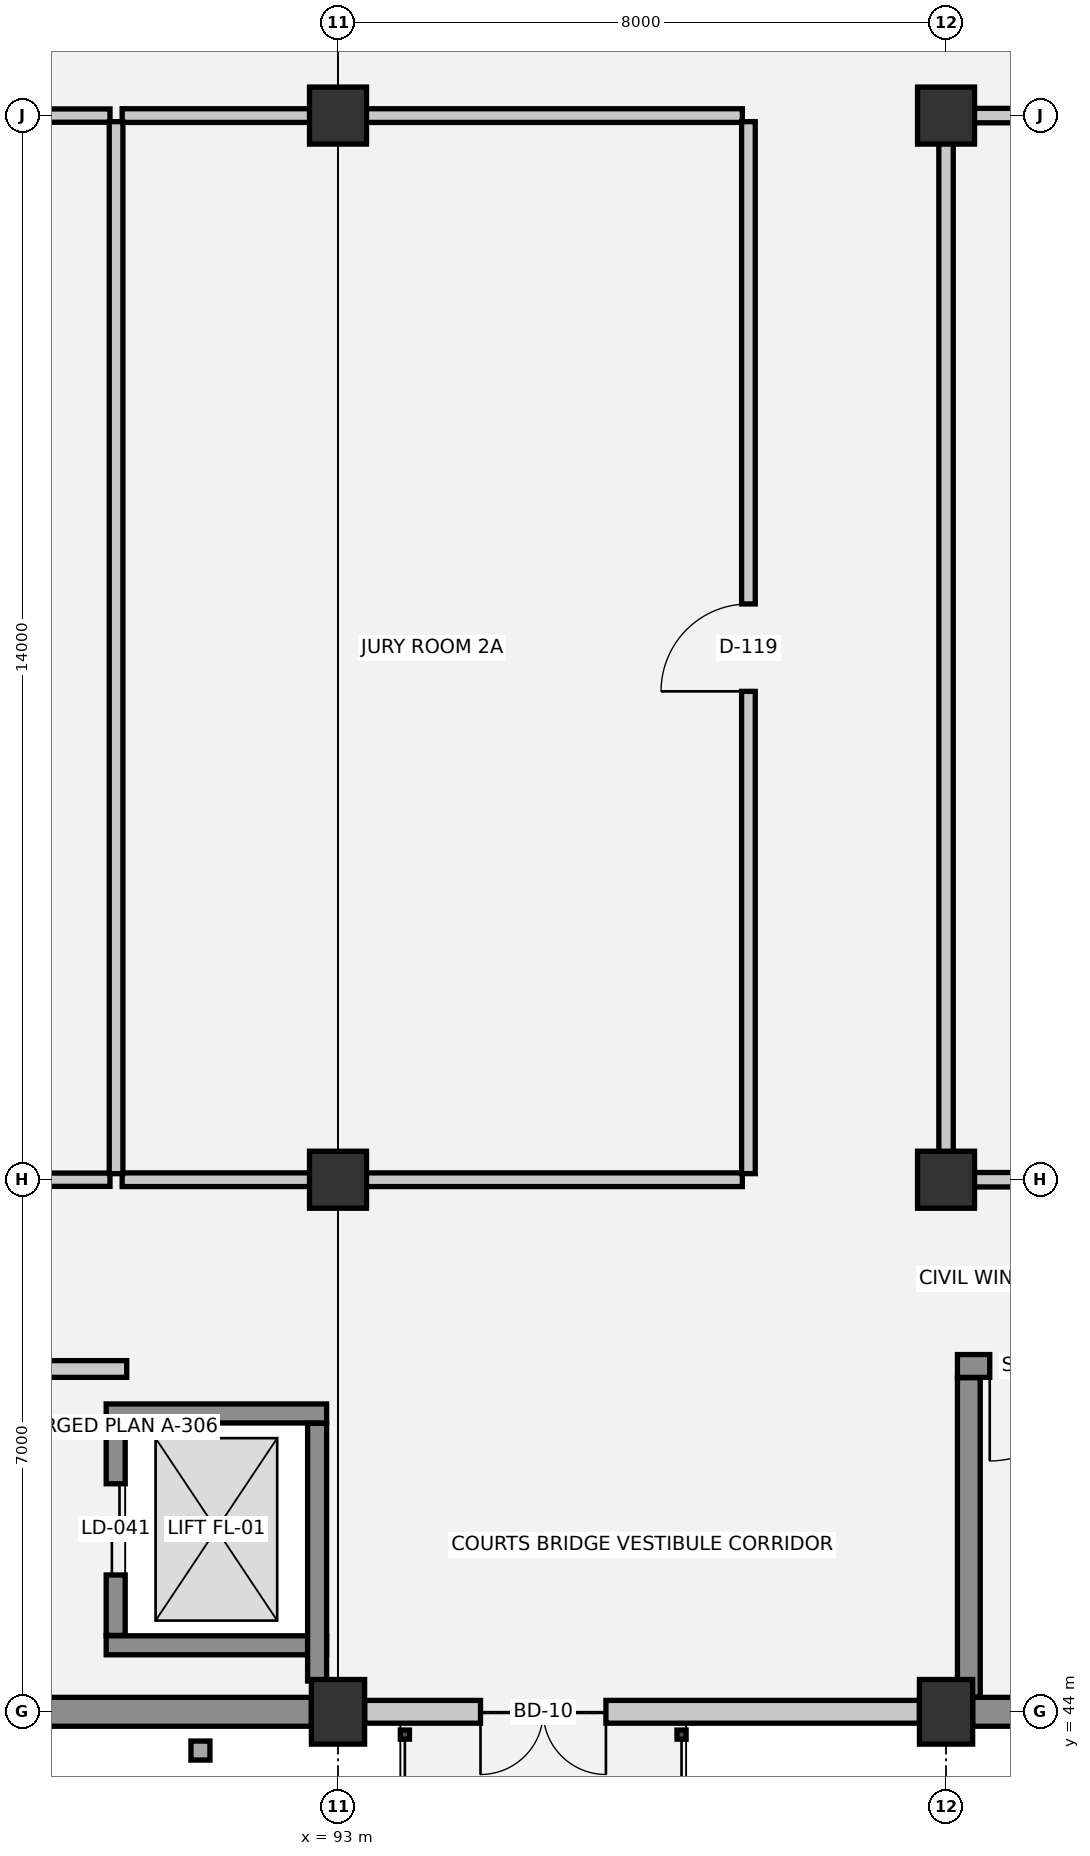
"""IFC4 building model, lengths in metres.
Left out: names, types, materials, properties, quantities, classifications, styles, units other than length and angle.
Written with IfcOpenShell. Run it as: python <this file> out.ifc"""

import sys

from ifc_helpers import new_model, si_unit, direction, frame, frame_2d, origin, origin_2d, place, context, subcontext, project, spatial, rectangle, extrude, element, fill, save


model = new_model("IFC4")
c1 = context("Model", 3, precision=1e-05, world=origin(), true_north=direction((0.0, 1.0)))
c2 = subcontext(c1, "Body", "Model", "MODEL_VIEW")
j1 = project(units=[si_unit("LENGTHUNIT", "METRE"), si_unit("PLANEANGLEUNIT", "RADIAN")], contexts=[c1])
p1 = place(None, origin())
s1 = spatial("IfcSite", under=j1, at=p1, CompositionType="ELEMENT")
p2 = place(p1, origin())
s2 = spatial("IfcBuilding", under=s1, at=p2, CompositionType="ELEMENT")
p3 = place(p2, frame((0.0, 0.0, 5.4)))
s3 = spatial("IfcBuildingStorey", under=s2, at=p3, CompositionType="ELEMENT", Elevation=5.4)
p4 = place(p3, frame((93.0, 44.0, 0.0), z_axis=(0.0, 0.0, 1.0), x_axis=(1.0, 0.0, 0.0)))
e1 = element("IfcColumn", 1, at=p4, inside=s3, PredefinedType="COLUMN", context=c2, shape_type="SweptSolid", body=[
    extrude(rectangle(XDim=0.7, YDim=0.85, at=origin_2d()), origin(), (0.0, 0.0, 1.0), 4.5),
])
for number, where, z_axis, x_axis in (
    (2, (93.0, 51.0, 0.0), (0.0, 0.0, 1.0), (1.0, 0.0, 0.0)),
    (3, (93.0, 65.0, 0.0), (0.0, 0.0, 1.0), (1.0, 0.0, 0.0)),
):
    element("IfcColumn", number, at=place(p3, frame(where, z_axis=z_axis, x_axis=x_axis)), inside=s3, PredefinedType="COLUMN", context=c2, shape_type="SweptSolid", body=[
        extrude(rectangle(XDim=0.75, YDim=0.75, at=origin_2d()), origin(), (0.0, 0.0, 1.0), 4.5),
    ])
p5 = place(p3, frame((101.0, 44.0, 0.0), z_axis=(0.0, 0.0, 1.0), x_axis=(1.0, 0.0, 0.0)))
e4 = element("IfcColumn", 4, at=p5, inside=s3, PredefinedType="COLUMN", context=c2, shape_type="SweptSolid", body=[
    extrude(rectangle(XDim=0.7, YDim=0.85, at=origin_2d()), origin(), (0.0, 0.0, 1.0), 4.5),
])
for number, where, z_axis, x_axis in (
    (5, (101.0, 51.0, 0.0), (0.0, 0.0, 1.0), (1.0, 0.0, 0.0)),
    (6, (101.0, 65.0, 0.0), (0.0, 0.0, 1.0), (1.0, 0.0, 0.0)),
):
    element("IfcColumn", number, at=place(p3, frame(where, z_axis=z_axis, x_axis=x_axis)), inside=s3, PredefinedType="COLUMN", context=c2, shape_type="SweptSolid", body=[
        extrude(rectangle(XDim=0.75, YDim=0.75, at=origin_2d()), origin(), (0.0, 0.0, 1.0), 4.5),
    ])
p6 = place(p3, frame((108.65, 44.0, 0.0), z_axis=(0.0, 0.0, 1.0), x_axis=(-1.0, 0.0, 0.0)))
e7 = element("IfcWall", 7, at=p6, inside=s3, PredefinedType="STANDARD", context=c2, shape_type="SweptSolid", body=[
    extrude(rectangle(XDim=7.3, YDim=0.38, at=frame_2d((3.65, 0.0))), origin(), (0.0, 0.0, 1.0), 3.23),
])
p7 = place(p6, frame((3.075, 0.0, 0.95)))
e8 = element("IfcOpeningElement", 8, at=p7, cuts=e7, PredefinedType="OPENING", context=c2, shape_type="SweptSolid", body=[
    extrude(rectangle(XDim=1.15, YDim=1.65, at=frame_2d((0.575, 0.825))), frame((0.0, 0.2, 0.0), z_axis=(0.0, -1.0, 0.0), x_axis=(1.0, 0.0, 0.0)), (0.0, 0.0, 1.0), 0.4),
])
p8 = place(p3, frame((100.65, 44.0, 0.0), z_axis=(0.0, 0.0, 1.0), x_axis=(-1.0, 0.0, 0.0)))
e9 = element("IfcWall", 9, at=p8, inside=s3, PredefinedType="SOLIDWALL", context=c2, shape_type="SweptSolid", body=[
    extrude(rectangle(XDim=7.3, YDim=0.3, at=frame_2d((3.65, 0.0))), origin(), (0.0, 0.0, 1.0), 3.23),
])
p9 = place(p8, frame((4.125, 0.0, 0.0)))
e10 = element("IfcOpeningElement", 10, at=p9, cuts=e9, PredefinedType="OPENING", context=c2, shape_type="SweptSolid", body=[
    extrude(rectangle(XDim=1.65, YDim=2.2, at=frame_2d((0.825, 1.1))), frame((0.0, 0.16, 0.0), z_axis=(0.0, -1.0, 0.0), x_axis=(1.0, 0.0, 0.0)), (0.0, 0.0, 1.0), 0.32),
])
p10 = place(p3, frame((92.65, 44.0, 0.0), z_axis=(0.0, 0.0, 1.0), x_axis=(-1.0, 0.0, 0.0)))
e11 = element("IfcWall", 11, at=p10, inside=s3, PredefinedType="STANDARD", context=c2, shape_type="SweptSolid", body=[
    extrude(rectangle(XDim=7.3, YDim=0.38, at=frame_2d((3.65, 0.0))), origin(), (0.0, 0.0, 1.0), 3.23),
])
for number, where, z_axis, x_axis in (
    (12, (89.95, 44.875, 0.0), (0.0, 0.0, 1.0), (1.0, 0.0, 0.0)),
    (13, (92.85, 47.925, 0.0), (0.0, 0.0, 1.0), (-1.0, 0.0, 0.0)),
):
    element("IfcWall", number, at=place(p3, frame(where, z_axis=z_axis, x_axis=x_axis)), inside=s3, PredefinedType="SHEAR", context=c2, shape_type="SweptSolid", body=[
        extrude(rectangle(XDim=2.9, YDim=0.25, at=frame_2d((1.45, 0.0))), origin(), (0.0, 0.0, 1.0), 4.5),
    ])
p11 = place(p3, frame((90.075, 47.795, 0.0), z_axis=(0.0, 0.0, 1.0), x_axis=(0.0, -1.0, 0.0)))
e14 = element("IfcWall", 14, at=p11, inside=s3, PredefinedType="SHEAR", context=c2, shape_type="SweptSolid", body=[
    extrude(rectangle(XDim=2.79, YDim=0.25, at=frame_2d((1.395, 0.0))), origin(), (0.0, 0.0, 1.0), 4.5),
])
p12 = place(p11, frame((0.795, 0.0, 0.0)))
e15 = element("IfcOpeningElement", 15, at=p12, cuts=e14, PredefinedType="OPENING", context=c2, shape_type="SweptSolid", body=[
    extrude(rectangle(XDim=1.2, YDim=2.2, at=frame_2d((0.6, 1.1))), frame((0.0, 0.135, 0.0), z_axis=(0.0, -1.0, 0.0), x_axis=(1.0, 0.0, 0.0)), (0.0, 0.0, 1.0), 0.27),
])
p13 = place(p3, frame((92.725, 44.405, 0.0), z_axis=(0.0, 0.0, 1.0), x_axis=(0.0, 1.0, 0.0)))
e16 = element("IfcWall", 16, at=p13, inside=s3, PredefinedType="SHEAR", context=c2, shape_type="SweptSolid", body=[
    extrude(rectangle(XDim=3.39, YDim=0.25, at=frame_2d((1.695, 0.0))), origin(), (0.0, 0.0, 1.0), 4.5),
])
p14 = place(p3, frame((108.85, 48.55, 0.0), z_axis=(0.0, 0.0, 1.0), x_axis=(-1.0, 0.0, 0.0)))
e17 = element("IfcWall", 17, at=p14, inside=s3, PredefinedType="SHEAR", context=c2, shape_type="SweptSolid", body=[
    extrude(rectangle(XDim=7.7, YDim=0.3, at=frame_2d((3.85, 0.0))), origin(), (0.0, 0.0, 1.0), 4.2),
])
p15 = place(p14, frame((6.025, 0.0, 0.0)))
e18 = element("IfcOpeningElement", 18, at=p15, cuts=e17, PredefinedType="OPENING", context=c2, shape_type="SweptSolid", body=[
    extrude(rectangle(XDim=1.25, YDim=2.15, at=frame_2d((0.625, 1.075))), frame((0.0, 0.16, 0.0), z_axis=(0.0, -1.0, 0.0), x_axis=(1.0, 0.0, 0.0)), (0.0, 0.0, 1.0), 0.32),
])
p16 = place(p3, frame((101.3, 48.395, 0.0), z_axis=(0.0, 0.0, 1.0), x_axis=(0.0, -1.0, 0.0)))
e19 = element("IfcWall", 19, at=p16, inside=s3, PredefinedType="SHEAR", context=c2, shape_type="SweptSolid", body=[
    extrude(rectangle(XDim=4.2, YDim=0.3, at=frame_2d((2.1, 0.0))), origin(), (0.0, 0.0, 1.0), 4.2),
])
p17 = place(p3, frame((85.18, 48.51, 0.0), z_axis=(0.0, 0.0, 1.0), x_axis=(1.0, 0.0, 0.0)))
e20 = element("IfcWall", 20, at=p17, inside=s3, PredefinedType="SOLIDWALL", context=c2, shape_type="SweptSolid", body=[
    extrude(rectangle(XDim=5.04, YDim=0.22, at=frame_2d((2.52, 0.0))), origin(), (0.0, 0.0, 1.0), 4.2),
])
p18 = place(p17, frame((1.87, 0.0, 0.0)))
e21 = element("IfcOpeningElement", 21, at=p18, cuts=e20, PredefinedType="OPENING", context=c2, shape_type="SweptSolid", body=[
    extrude(rectangle(XDim=1.3, YDim=2.15, at=frame_2d((0.65, 1.075))), frame((0.0, 0.12, 0.0), z_axis=(0.0, -1.0, 0.0), x_axis=(1.0, 0.0, 0.0)), (0.0, 0.0, 1.0), 0.24),
])
p19 = place(p3, frame((82.4, 51.0, 0.0), z_axis=(0.0, 0.0, 1.0), x_axis=(1.0, 0.0, 0.0)))
e22 = element("IfcWall", 22, at=p19, inside=s3, PredefinedType="PARTITIONING", context=c2, shape_type="SweptSolid", body=[
    extrude(rectangle(XDim=7.6, YDim=0.175, at=frame_2d((3.8, 0.0))), origin(), (0.0, 0.0, 1.0), 3.4),
])
p20 = place(p3, frame((90.16, 51.0, 0.0), z_axis=(0.0, 0.0, 1.0), x_axis=(1.0, 0.0, 0.0)))
e23 = element("IfcWall", 23, at=p20, inside=s3, PredefinedType="PARTITIONING", context=c2, shape_type="SweptSolid", body=[
    extrude(rectangle(XDim=8.16, YDim=0.18, at=frame_2d((4.08, 0.0))), origin(), (0.0, 0.0, 1.0), 3.4),
])
p21 = place(p3, frame((101.08, 51.0, 0.0), z_axis=(0.0, 0.0, 1.0), x_axis=(1.0, 0.0, 0.0)))
e24 = element("IfcWall", 24, at=p21, inside=s3, PredefinedType="PARTITIONING", context=c2, shape_type="SweptSolid", body=[
    extrude(rectangle(XDim=22.84, YDim=0.19, at=frame_2d((11.42, 0.0))), origin(), (0.0, 0.0, 1.0), 3.4),
])
p22 = place(p21, frame((10.445, 0.0, 0.0)))
e25 = element("IfcOpeningElement", 25, at=p22, cuts=e24, PredefinedType="OPENING", context=c2, shape_type="SweptSolid", body=[
    extrude(rectangle(XDim=1.95, YDim=2.35, at=frame_2d((0.975, 1.175))), frame((0.0, 0.105, 0.0), z_axis=(0.0, -1.0, 0.0), x_axis=(1.0, 0.0, 0.0)), (0.0, 0.0, 1.0), 0.21),
])
p23 = place(p3, frame((77.68, 65.0, 0.0), z_axis=(0.0, 0.0, 1.0), x_axis=(1.0, 0.0, 0.0)))
e26 = element("IfcWall", 26, at=p23, inside=s3, PredefinedType="PARTITIONING", context=c2, shape_type="SweptSolid", body=[
    extrude(rectangle(XDim=12.32, YDim=0.175, at=frame_2d((6.16, 0.0))), origin(), (0.0, 0.0, 1.0), 3.4),
])
p24 = place(p23, frame((3.804, 0.0, 0.0)))
e27 = element("IfcOpeningElement", 27, at=p24, cuts=e26, PredefinedType="OPENING", context=c2, shape_type="SweptSolid", body=[
    extrude(rectangle(XDim=1.75, YDim=2.3, at=frame_2d((0.875, 1.15))), frame((0.0, 0.097, 0.0), z_axis=(0.0, -1.0, 0.0), x_axis=(1.0, 0.0, 0.0)), (0.0, 0.0, 1.0), 0.195),
])
p25 = place(p3, frame((90.16, 65.0, 0.0), z_axis=(0.0, 0.0, 1.0), x_axis=(1.0, 0.0, 0.0)))
e28 = element("IfcWall", 28, at=p25, inside=s3, PredefinedType="PARTITIONING", context=c2, shape_type="SweptSolid", body=[
    extrude(rectangle(XDim=8.16, YDim=0.18, at=frame_2d((4.08, 0.0))), origin(), (0.0, 0.0, 1.0), 3.4),
])
p26 = place(p3, frame((101.08, 65.0, 0.0), z_axis=(0.0, 0.0, 1.0), x_axis=(1.0, 0.0, 0.0)))
e29 = element("IfcWall", 29, at=p26, inside=s3, PredefinedType="PARTITIONING", context=c2, shape_type="SweptSolid", body=[
    extrude(rectangle(XDim=22.84, YDim=0.19, at=frame_2d((11.42, 0.0))), origin(), (0.0, 0.0, 1.0), 3.4),
])
p27 = place(p3, frame((90.08, 51.08, 0.0), z_axis=(0.0, 0.0, 1.0), x_axis=(0.0, 1.0, 0.0)))
e30 = element("IfcWall", 30, at=p27, inside=s3, PredefinedType="PARTITIONING", context=c2, shape_type="SweptSolid", body=[
    extrude(rectangle(XDim=13.84, YDim=0.18, at=frame_2d((6.92, 0.0))), origin(), (0.0, 0.0, 1.0), 4.14),
])
p28 = place(p3, frame((98.4, 51.08, 0.0), z_axis=(0.0, 0.0, 1.0), x_axis=(0.0, 1.0, 0.0)))
e31 = element("IfcWall", 31, at=p28, inside=s3, PredefinedType="PARTITIONING", context=c2, shape_type="SweptSolid", body=[
    extrude(rectangle(XDim=13.84, YDim=0.18, at=frame_2d((6.92, 0.0))), origin(), (0.0, 0.0, 1.0), 4.14),
])
p29 = place(p28, frame((6.345, 0.0, 0.0)))
e32 = element("IfcOpeningElement", 32, at=p29, cuts=e31, PredefinedType="OPENING", context=c2, shape_type="SweptSolid", body=[
    extrude(rectangle(XDim=1.15, YDim=2.2, at=frame_2d((0.575, 1.1))), frame((0.0, 0.1, 0.0), z_axis=(0.0, -1.0, 0.0), x_axis=(1.0, 0.0, 0.0)), (0.0, 0.0, 1.0), 0.2),
])
p30 = place(p3, frame((101.0, 51.08, 0.0), z_axis=(0.0, 0.0, 1.0), x_axis=(0.0, 1.0, 0.0)))
e33 = element("IfcWall", 33, at=p30, inside=s3, PredefinedType="PARTITIONING", context=c2, shape_type="SweptSolid", body=[
    extrude(rectangle(XDim=13.84, YDim=0.19, at=frame_2d((6.92, 0.0))), origin(), (0.0, 0.0, 1.0), 3.25),
])
p31 = place(p9, origin())
e34 = element("IfcDoor", 34, at=p31, inside=s3, OperationType="DOUBLE_DOOR_SINGLE_SWING", PredefinedType="DOOR", context=c2, shape_type="SweptSolid", body=[
    extrude(rectangle(XDim=1.65, YDim=2.2, at=frame_2d((0.825, 1.1))), frame((0.0, 0.025, 0.0), z_axis=(0.0, -1.0, 0.0), x_axis=(1.0, 0.0, 0.0)), (0.0, 0.0, 1.0), 0.05),
])
fill(e10, e34)
p32 = place(p12, origin())
e35 = element("IfcDoor", 35, at=p32, inside=s3, OperationType="DOUBLE_DOOR_SLIDING", PredefinedType="DOOR", context=c2, shape_type="SweptSolid", body=[
    extrude(rectangle(XDim=1.2, YDim=2.2, at=frame_2d((0.6, 1.1))), frame((0.0, 0.025, 0.0), z_axis=(0.0, -1.0, 0.0), x_axis=(1.0, 0.0, 0.0)), (0.0, 0.0, 1.0), 0.05),
])
fill(e15, e35)
p33 = place(p15, origin())
e36 = element("IfcDoor", 36, at=p33, inside=s3, OperationType="SINGLE_SWING_RIGHT", PredefinedType="DOOR", context=c2, shape_type="SweptSolid", body=[
    extrude(rectangle(XDim=1.25, YDim=2.15, at=frame_2d((0.625, 1.075))), frame((0.0, 0.025, 0.0), z_axis=(0.0, -1.0, 0.0), x_axis=(1.0, 0.0, 0.0)), (0.0, 0.0, 1.0), 0.05),
])
fill(e18, e36)
p34 = place(p29, origin())
e37 = element("IfcDoor", 37, at=p34, inside=s3, OperationType="SINGLE_SWING_LEFT", PredefinedType="DOOR", context=c2, shape_type="SweptSolid", body=[
    extrude(rectangle(XDim=1.15, YDim=2.2, at=frame_2d((0.575, 1.1))), frame((0.0, 0.025, 0.0), z_axis=(0.0, -1.0, 0.0), x_axis=(1.0, 0.0, 0.0)), (0.0, 0.0, 1.0), 0.05),
])
fill(e32, e37)
save(model, sys.argv[1])
